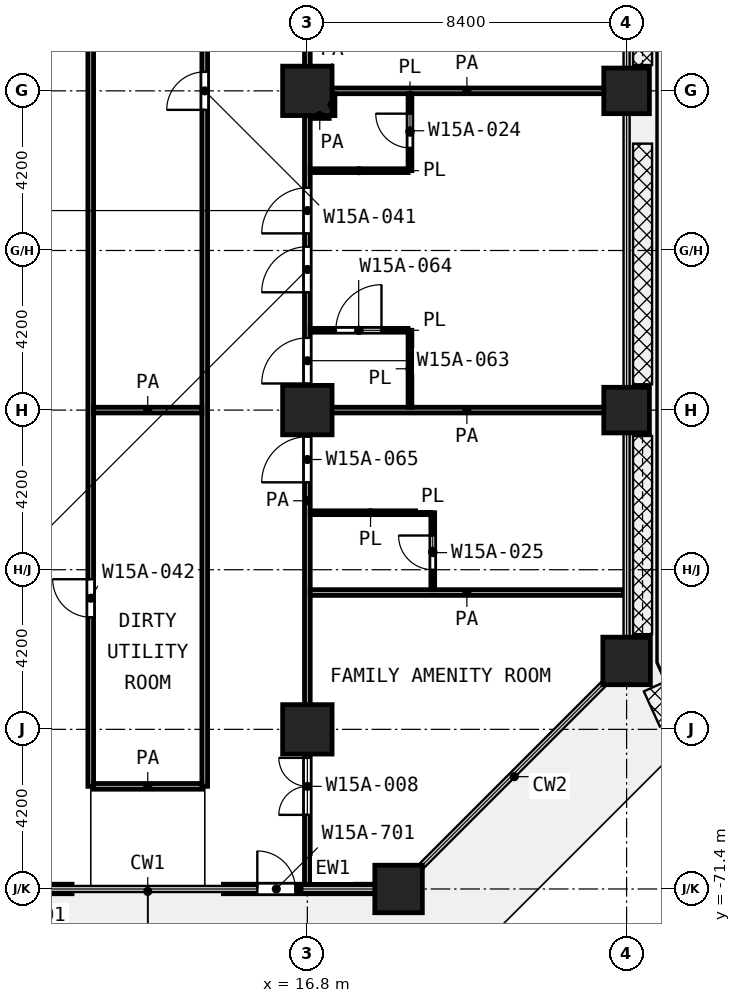
"""IFC4 building model, lengths in metres.
Left out: names, types, materials, properties, quantities, classifications, styles, units other than length and angle.
Written with IfcOpenShell. Run it as: python <this file> out.ifc"""

import sys

from ifc_helpers import new_model, si_unit, direction, frame, frame_2d, origin, origin_2d, place, context, subcontext, project, spatial, rectangle, extrude, element, fill, save


model = new_model("IFC4")
c1 = context("Model", 3, precision=1e-05, world=origin(), true_north=direction((0.0, 1.0)))
c2 = subcontext(c1, "Body", "Model", "MODEL_VIEW")
j1 = project(units=[si_unit("LENGTHUNIT", "METRE"), si_unit("PLANEANGLEUNIT", "RADIAN")], contexts=[c1])
p1 = place(None, origin())
s1 = spatial("IfcSite", under=j1, at=p1, CompositionType="ELEMENT")
p2 = place(p1, origin())
s2 = spatial("IfcBuilding", under=s1, at=p2, CompositionType="ELEMENT")
p3 = place(p2, frame((0.0, 0.0, 68.6)))
s3 = spatial("IfcBuildingStorey", under=s2, at=p3, CompositionType="ELEMENT", Elevation=68.6)
p4 = place(p3, frame((16.8, -50.4, 0.0), z_axis=(0.0, 0.0, 1.0), x_axis=(1.0, 0.0, 0.0)))
e1 = element("IfcColumn", 1, at=p4, inside=s3, PredefinedType="COLUMN", context=c2, shape_type="SweptSolid", body=[
    extrude(rectangle(XDim=1.3, YDim=1.3, at=origin_2d()), origin(), (0.0, 0.0, 1.0), 4.2),
])
p5 = place(p3, frame((25.2, -50.4, 0.0), z_axis=(0.0, 0.0, 1.0), x_axis=(1.0, 0.0, 0.0)))
e2 = element("IfcColumn", 2, at=p5, inside=s3, PredefinedType="COLUMN", context=c2, shape_type="SweptSolid", body=[
    extrude(rectangle(XDim=1.2, YDim=1.2, at=origin_2d()), origin(), (0.0, 0.0, 1.0), 4.2),
])
p6 = place(p3, frame((16.8, -58.8, 0.0), z_axis=(0.0, 0.0, 1.0), x_axis=(1.0, 0.0, 0.0)))
e3 = element("IfcColumn", 3, at=p6, inside=s3, PredefinedType="COLUMN", context=c2, shape_type="SweptSolid", body=[
    extrude(rectangle(XDim=1.3, YDim=1.3, at=origin_2d()), origin(), (0.0, 0.0, 1.0), 4.2),
])
p7 = place(p3, frame((25.2, -58.8, 0.0), z_axis=(0.0, 0.0, 1.0), x_axis=(1.0, 0.0, 0.0)))
e4 = element("IfcColumn", 4, at=p7, inside=s3, PredefinedType="COLUMN", context=c2, shape_type="SweptSolid", body=[
    extrude(rectangle(XDim=1.2, YDim=1.2, at=origin_2d()), origin(), (0.0, 0.0, 1.0), 4.2),
])
p8 = place(p3, frame((25.2, -65.4, 0.0), z_axis=(0.0, 0.0, 1.0), x_axis=(1.0, 0.0, 0.0)))
e5 = element("IfcColumn", 5, at=p8, inside=s3, PredefinedType="COLUMN", context=c2, shape_type="SweptSolid", body=[
    extrude(rectangle(XDim=1.25, YDim=1.25, at=origin_2d()), origin(), (0.0, 0.0, 1.0), 4.2),
])
p9 = place(p3, frame((16.8, -67.2, 0.0), z_axis=(0.0, 0.0, 1.0), x_axis=(1.0, 0.0, 0.0)))
e6 = element("IfcColumn", 6, at=p9, inside=s3, PredefinedType="COLUMN", context=c2, shape_type="SweptSolid", body=[
    extrude(rectangle(XDim=1.3, YDim=1.3, at=origin_2d()), origin(), (0.0, 0.0, 1.0), 4.2),
])
p10 = place(p3, frame((19.2, -71.4, 0.0), z_axis=(0.0, 0.0, 1.0), x_axis=(1.0, 0.0, 0.0)))
e7 = element("IfcColumn", 7, at=p10, inside=s3, PredefinedType="COLUMN", context=c2, shape_type="SweptSolid", body=[
    extrude(rectangle(XDim=1.25, YDim=1.25, at=origin_2d()), origin(), (0.0, 0.0, 1.0), 4.2),
])
p11 = place(p3, frame((6.625, -71.4, 0.0), z_axis=(0.0, 0.0, 1.0), x_axis=(1.0, 0.0, 0.0)))
e8 = element("IfcWall", 8, at=p11, inside=s3, PredefinedType="SOLIDWALL", context=c2, shape_type="SweptSolid", body=[
    extrude(rectangle(XDim=3.983, YDim=0.25, at=frame_2d((1.992, 0.0))), origin(), (0.0, 0.0, 1.0), 3.78),
])
p12 = place(p11, frame((2.092, 0.0, 0.0)))
e9 = element("IfcOpeningElement", 9, at=p12, cuts=e8, PredefinedType="OPENING", context=c2, shape_type="SweptSolid", body=[
    extrude(rectangle(XDim=1.0, YDim=2.1, at=frame_2d((0.5, 1.05))), frame((0.0, 0.135, 0.0), z_axis=(0.0, -1.0, 0.0), x_axis=(1.0, 0.0, 0.0)), (0.0, 0.0, 1.0), 0.27),
])
p13 = place(p3, frame((14.592, -71.4, 0.0), z_axis=(0.0, 0.0, 1.0), x_axis=(1.0, 0.0, 0.0)))
e10 = element("IfcWall", 10, at=p13, inside=s3, PredefinedType="SOLIDWALL", context=c2, shape_type="SweptSolid", body=[
    extrude(rectangle(XDim=3.983, YDim=0.25, at=frame_2d((1.992, 0.0))), origin(), (0.0, 0.0, 1.0), 3.78),
])
p14 = place(p13, frame((0.892, 0.0, 0.0)))
e11 = element("IfcOpeningElement", 11, at=p14, cuts=e10, PredefinedType="OPENING", context=c2, shape_type="SweptSolid", body=[
    extrude(rectangle(XDim=1.0, YDim=2.1, at=frame_2d((0.5, 1.05))), frame((0.0, 0.135, 0.0), z_axis=(0.0, -1.0, 0.0), x_axis=(1.0, 0.0, 0.0)), (0.0, 0.0, 1.0), 0.27),
])
p15 = place(p3, frame((16.875, -61.5, 0.0), z_axis=(0.0, 0.0, 1.0), x_axis=(1.0, 0.0, 0.0)))
e12 = element("IfcWall", 12, at=p15, inside=s3, PredefinedType="PARTITIONING", context=c2, shape_type="SweptSolid", body=[
    extrude(rectangle(XDim=3.175, YDim=0.1, at=frame_2d((1.587, 0.0))), origin(), (0.0, 0.0, 1.0), 3.9),
])
p16 = place(p3, frame((16.875, -56.7, 0.0), z_axis=(0.0, 0.0, 1.0), x_axis=(1.0, 0.0, 0.0)))
e13 = element("IfcWall", 13, at=p16, inside=s3, PredefinedType="PARTITIONING", context=c2, shape_type="SweptSolid", body=[
    extrude(rectangle(XDim=2.575, YDim=0.1, at=frame_2d((1.288, 0.0))), origin(), (0.0, 0.0, 1.0), 3.9),
])
p17 = place(p16, frame((0.675, 0.0, 0.0)))
e14 = element("IfcOpeningElement", 14, at=p17, cuts=e13, PredefinedType="OPENING", context=c2, shape_type="SweptSolid", body=[
    extrude(rectangle(XDim=1.2, YDim=2.1, at=frame_2d((0.6, 1.05))), frame((0.0, 0.06, 0.0), z_axis=(0.0, -1.0, 0.0), x_axis=(1.0, 0.0, 0.0)), (0.0, 0.0, 1.0), 0.12),
])
p18 = place(p3, frame((16.875, -52.5, 0.0), z_axis=(0.0, 0.0, 1.0), x_axis=(1.0, 0.0, 0.0)))
e15 = element("IfcWall", 15, at=p18, inside=s3, PredefinedType="PARTITIONING", context=c2, shape_type="SweptSolid", body=[
    extrude(rectangle(XDim=2.575, YDim=0.1, at=frame_2d((1.288, 0.0))), origin(), (0.0, 0.0, 1.0), 3.9),
])
p19 = place(p3, frame((19.5, -58.725, 0.0), z_axis=(0.0, 0.0, 1.0), x_axis=(0.0, 1.0, 0.0)))
e16 = element("IfcWall", 16, at=p19, inside=s3, PredefinedType="PARTITIONING", context=c2, shape_type="SweptSolid", body=[
    extrude(rectangle(XDim=2.025, YDim=0.1, at=frame_2d((1.013, 0.0))), origin(), (0.0, 0.0, 1.0), 3.9),
])
p20 = place(p3, frame((19.5, -52.5, 0.0), z_axis=(0.0, 0.0, 1.0), x_axis=(0.0, 1.0, 0.0)))
e17 = element("IfcWall", 17, at=p20, inside=s3, PredefinedType="PARTITIONING", context=c2, shape_type="SweptSolid", body=[
    extrude(rectangle(XDim=2.025, YDim=0.1, at=frame_2d((1.012, 0.0))), origin(), (0.0, 0.0, 1.0), 3.9),
])
p21 = place(p20, frame((0.6, 0.0, 0.0)))
e18 = element("IfcOpeningElement", 18, at=p21, cuts=e17, PredefinedType="OPENING", context=c2, shape_type="SweptSolid", body=[
    extrude(rectangle(XDim=0.9, YDim=2.1, at=frame_2d((0.45, 1.05))), frame((0.0, 0.06, 0.0), z_axis=(0.0, -1.0, 0.0), x_axis=(1.0, 0.0, 0.0)), (0.0, 0.0, 1.0), 0.12),
])
p22 = place(p3, frame((20.1, -63.525, 0.0), z_axis=(0.0, 0.0, 1.0), x_axis=(0.0, 1.0, 0.0)))
e19 = element("IfcWall", 19, at=p22, inside=s3, PredefinedType="PARTITIONING", context=c2, shape_type="SweptSolid", body=[
    extrude(rectangle(XDim=2.025, YDim=0.1, at=frame_2d((1.012, 0.0))), origin(), (0.0, 0.0, 1.0), 3.9),
])
p23 = place(p22, frame((0.525, 0.0, 0.0)))
e20 = element("IfcOpeningElement", 20, at=p23, cuts=e19, PredefinedType="OPENING", context=c2, shape_type="SweptSolid", body=[
    extrude(rectangle(XDim=0.9, YDim=2.1, at=frame_2d((0.45, 1.05))), frame((0.0, 0.06, 0.0), z_axis=(0.0, -1.0, 0.0), x_axis=(1.0, 0.0, 0.0)), (0.0, 0.0, 1.0), 0.12),
])
p24 = place(p3, frame((11.175, -68.7, 0.0), z_axis=(0.0, 0.0, 1.0), x_axis=(1.0, 0.0, 0.0)))
e21 = element("IfcWall", 21, at=p24, inside=s3, PredefinedType="PARTITIONING", context=c2, shape_type="SweptSolid", body=[
    extrude(rectangle(XDim=2.85, YDim=0.15, at=frame_2d((1.425, 0.0))), origin(), (0.0, 0.0, 1.0), 3.9),
])
p25 = place(p3, frame((16.875, -63.6, 0.0), z_axis=(0.0, 0.0, 1.0), x_axis=(1.0, 0.0, 0.0)))
e22 = element("IfcWall", 22, at=p25, inside=s3, PredefinedType="PARTITIONING", context=c2, shape_type="SweptSolid", body=[
    extrude(rectangle(XDim=8.245, YDim=0.15, at=frame_2d((4.123, 0.0))), origin(), (0.0, 0.0, 1.0), 3.9),
])
p26 = place(p3, frame((11.175, -58.8, 0.0), z_axis=(0.0, 0.0, 1.0), x_axis=(1.0, 0.0, 0.0)))
e23 = element("IfcWall", 23, at=p26, inside=s3, PredefinedType="PARTITIONING", context=c2, shape_type="SweptSolid", body=[
    extrude(rectangle(XDim=2.85, YDim=0.15, at=frame_2d((1.425, 0.0))), origin(), (0.0, 0.0, 1.0), 3.9),
])
p27 = place(p3, frame((16.875, -58.8, 0.0), z_axis=(0.0, 0.0, 1.0), x_axis=(1.0, 0.0, 0.0)))
e24 = element("IfcWall", 24, at=p27, inside=s3, PredefinedType="PARTITIONING", context=c2, shape_type="SweptSolid", body=[
    extrude(rectangle(XDim=8.245, YDim=0.15, at=frame_2d((4.123, 0.0))), origin(), (0.0, 0.0, 1.0), 3.9),
])
p28 = place(p3, frame((16.877, -51.05, 0.0), z_axis=(0.0, 0.0, 1.0), x_axis=(1.0, 0.0, 0.0)))
e25 = element("IfcWall", 25, at=p28, inside=s3, PredefinedType="PARTITIONING", context=c2, shape_type="SweptSolid", body=[
    extrude(rectangle(XDim=0.498, YDim=0.15, at=frame_2d((0.249, 0.0))), origin(), (0.0, 0.0, 1.0), 3.9),
])
p29 = place(p3, frame((16.877, -50.4, 0.0), z_axis=(0.0, 0.0, 1.0), x_axis=(1.0, 0.0, 0.0)))
e26 = element("IfcWall", 26, at=p29, inside=s3, PredefinedType="PARTITIONING", context=c2, shape_type="SweptSolid", body=[
    extrude(rectangle(XDim=8.243, YDim=0.15, at=frame_2d((4.122, 0.0))), origin(), (0.0, 0.0, 1.0), 3.9),
])
p30 = place(p3, frame((11.1, -68.7, 0.0), z_axis=(0.0, 0.0, 1.0), x_axis=(0.0, 1.0, 0.0)))
e27 = element("IfcWall", 27, at=p30, inside=s3, PredefinedType="PARTITIONING", context=c2, shape_type="SweptSolid", body=[
    extrude(rectangle(XDim=39.3, YDim=0.15, at=frame_2d((19.65, 0.0))), origin(), (0.0, 0.0, 1.0), 3.9),
])
p31 = place(p30, frame((34.3, 0.0, 0.0)))
e28 = element("IfcOpeningElement", 28, at=p31, cuts=e27, PredefinedType="OPENING", context=c2, shape_type="SweptSolid", body=[
    extrude(rectangle(XDim=1.0, YDim=2.1, at=frame_2d((0.5, 1.05))), frame((0.0, 0.085, 0.0), z_axis=(0.0, -1.0, 0.0), x_axis=(1.0, 0.0, 0.0)), (0.0, 0.0, 1.0), 0.17),
])
p32 = place(p30, frame((28.0, 0.0, 0.0)))
e29 = element("IfcOpeningElement", 29, at=p32, cuts=e27, PredefinedType="OPENING", context=c2, shape_type="SweptSolid", body=[
    extrude(rectangle(XDim=1.0, YDim=2.1, at=frame_2d((0.5, 1.05))), frame((0.0, 0.085, 0.0), z_axis=(0.0, -1.0, 0.0), x_axis=(1.0, 0.0, 0.0)), (0.0, 0.0, 1.0), 0.17),
])
p33 = place(p30, frame((4.45, 0.0, 0.0)))
e30 = element("IfcOpeningElement", 30, at=p33, cuts=e27, PredefinedType="OPENING", context=c2, shape_type="SweptSolid", body=[
    extrude(rectangle(XDim=1.0, YDim=2.1, at=frame_2d((0.5, 1.05))), frame((0.0, 0.085, 0.0), z_axis=(0.0, -1.0, 0.0), x_axis=(1.0, 0.0, 0.0)), (0.0, 0.0, 1.0), 0.17),
])
p34 = place(p3, frame((14.1, -68.7, 0.0), z_axis=(0.0, 0.0, 1.0), x_axis=(0.0, 1.0, 0.0)))
e31 = element("IfcWall", 31, at=p34, inside=s3, PredefinedType="PARTITIONING", context=c2, shape_type="SweptSolid", body=[
    extrude(rectangle(XDim=39.3, YDim=0.15, at=frame_2d((19.65, 0.0))), origin(), (0.0, 0.0, 1.0), 3.9),
])
p35 = place(p34, frame((17.8, 0.0, 0.0)))
e32 = element("IfcOpeningElement", 32, at=p35, cuts=e31, PredefinedType="OPENING", context=c2, shape_type="SweptSolid", body=[
    extrude(rectangle(XDim=1.0, YDim=2.1, at=frame_2d((0.5, 1.05))), frame((0.0, 0.085, 0.0), z_axis=(0.0, -1.0, 0.0), x_axis=(1.0, 0.0, 0.0)), (0.0, 0.0, 1.0), 0.17),
])
p36 = place(p3, frame((16.8, -71.32, 0.0), z_axis=(0.0, 0.0, 1.0), x_axis=(0.0, 1.0, 0.0)))
e33 = element("IfcWall", 33, at=p36, inside=s3, PredefinedType="PARTITIONING", context=c2, shape_type="SweptSolid", body=[
    extrude(rectangle(XDim=20.268, YDim=0.15, at=frame_2d((10.134, 0.0))), origin(), (0.0, 0.0, 1.0), 3.9),
])
p37 = place(p36, frame((17.17, 0.0, 0.0)))
e34 = element("IfcOpeningElement", 34, at=p37, cuts=e33, PredefinedType="OPENING", context=c2, shape_type="SweptSolid", body=[
    extrude(rectangle(XDim=1.2, YDim=2.1, at=frame_2d((0.6, 1.05))), frame((0.0, 0.085, 0.0), z_axis=(0.0, -1.0, 0.0), x_axis=(1.0, 0.0, 0.0)), (0.0, 0.0, 1.0), 0.17),
])
p38 = place(p36, frame((15.62, 0.0, 0.0)))
e35 = element("IfcOpeningElement", 35, at=p38, cuts=e33, PredefinedType="OPENING", context=c2, shape_type="SweptSolid", body=[
    extrude(rectangle(XDim=1.2, YDim=2.1, at=frame_2d((0.6, 1.05))), frame((0.0, 0.085, 0.0), z_axis=(0.0, -1.0, 0.0), x_axis=(1.0, 0.0, 0.0)), (0.0, 0.0, 1.0), 0.17),
])
p39 = place(p36, frame((13.22, 0.0, 0.0)))
e36 = element("IfcOpeningElement", 36, at=p39, cuts=e33, PredefinedType="OPENING", context=c2, shape_type="SweptSolid", body=[
    extrude(rectangle(XDim=1.2, YDim=2.1, at=frame_2d((0.6, 1.05))), frame((0.0, 0.085, 0.0), z_axis=(0.0, -1.0, 0.0), x_axis=(1.0, 0.0, 0.0)), (0.0, 0.0, 1.0), 0.17),
])
p40 = place(p36, frame((10.62, 0.0, 0.0)))
e37 = element("IfcOpeningElement", 37, at=p40, cuts=e33, PredefinedType="OPENING", context=c2, shape_type="SweptSolid", body=[
    extrude(rectangle(XDim=1.2, YDim=2.1, at=frame_2d((0.6, 1.05))), frame((0.0, 0.085, 0.0), z_axis=(0.0, -1.0, 0.0), x_axis=(1.0, 0.0, 0.0)), (0.0, 0.0, 1.0), 0.17),
])
p41 = place(p36, frame((1.87, 0.0, 0.0)))
e38 = element("IfcOpeningElement", 38, at=p41, cuts=e33, PredefinedType="OPENING", context=c2, shape_type="SweptSolid", body=[
    extrude(rectangle(XDim=1.5, YDim=2.1, at=frame_2d((0.75, 1.05))), frame((0.0, 0.085, 0.0), z_axis=(0.0, -1.0, 0.0), x_axis=(1.0, 0.0, 0.0)), (0.0, 0.0, 1.0), 0.17),
])
p42 = place(p3, frame((16.8, -50.398, 0.0), z_axis=(0.0, 0.0, 1.0), x_axis=(0.0, 1.0, 0.0)))
e39 = element("IfcWall", 39, at=p42, inside=s3, PredefinedType="PARTITIONING", context=c2, shape_type="SweptSolid", body=[
    extrude(rectangle(XDim=25.298, YDim=0.15, at=frame_2d((12.649, 0.0))), origin(), (0.0, 0.0, 1.0), 3.9),
])
p43 = place(p42, frame((14.598, 0.0, 0.0)))
e40 = element("IfcOpeningElement", 40, at=p43, cuts=e39, PredefinedType="OPENING", context=c2, shape_type="SweptSolid", body=[
    extrude(rectangle(XDim=1.5, YDim=2.1, at=frame_2d((0.75, 1.05))), frame((0.0, 0.085, 0.0), z_axis=(0.0, -1.0, 0.0), x_axis=(1.0, 0.0, 0.0)), (0.0, 0.0, 1.0), 0.17),
])
p44 = place(p42, frame((6.498, 0.0, 0.0)))
e41 = element("IfcOpeningElement", 41, at=p44, cuts=e39, PredefinedType="OPENING", context=c2, shape_type="SweptSolid", body=[
    extrude(rectangle(XDim=1.2, YDim=2.1, at=frame_2d((0.6, 1.05))), frame((0.0, 0.085, 0.0), z_axis=(0.0, -1.0, 0.0), x_axis=(1.0, 0.0, 0.0)), (0.0, 0.0, 1.0), 0.17),
])
p45 = place(p42, frame((5.048, 0.0, 0.0)))
e42 = element("IfcOpeningElement", 42, at=p45, cuts=e39, PredefinedType="OPENING", context=c2, shape_type="SweptSolid", body=[
    extrude(rectangle(XDim=1.1, YDim=2.1, at=frame_2d((0.55, 1.05))), frame((0.0, 0.085, 0.0), z_axis=(0.0, -1.0, 0.0), x_axis=(1.0, 0.0, 0.0)), (0.0, 0.0, 1.0), 0.17),
])
p46 = place(p42, frame((1.199, 0.0, 0.0)))
e43 = element("IfcOpeningElement", 43, at=p46, cuts=e39, PredefinedType="OPENING", context=c2, shape_type="SweptSolid", body=[
    extrude(rectangle(XDim=1.2, YDim=2.1, at=frame_2d((0.6, 1.05))), frame((0.0, 0.085, 0.0), z_axis=(0.0, -1.0, 0.0), x_axis=(1.0, 0.0, 0.0)), (0.0, 0.0, 1.0), 0.17),
])
p47 = place(p3, frame((17.45, -51.05, 0.0), z_axis=(0.0, 0.0, 1.0), x_axis=(0.0, 1.0, 0.0)))
e44 = element("IfcWall", 44, at=p47, inside=s3, PredefinedType="PARTITIONING", context=c2, shape_type="SweptSolid", body=[
    extrude(rectangle(XDim=0.575, YDim=0.15, at=frame_2d((0.288, 0.0))), origin(), (0.0, 0.0, 1.0), 3.9),
])
p48 = place(p14, origin())
e45 = element("IfcDoor", 45, at=p48, inside=s3, OperationType="SINGLE_SWING_LEFT", PredefinedType="DOOR", context=c2, shape_type="SweptSolid", body=[
    extrude(rectangle(XDim=1.0, YDim=2.1, at=frame_2d((0.5, 1.05))), frame((0.0, 0.025, 0.0), z_axis=(0.0, -1.0, 0.0), x_axis=(1.0, 0.0, 0.0)), (0.0, 0.0, 1.0), 0.05),
])
fill(e11, e45)
p49 = place(p35, origin())
e46 = element("IfcDoor", 46, at=p49, inside=s3, OperationType="SINGLE_SWING_LEFT", PredefinedType="DOOR", context=c2, shape_type="SweptSolid", body=[
    extrude(rectangle(XDim=1.0, YDim=2.1, at=frame_2d((0.5, 1.05))), frame((0.0, 0.025, 0.0), z_axis=(0.0, -1.0, 0.0), x_axis=(1.0, 0.0, 0.0)), (0.0, 0.0, 1.0), 0.05),
])
fill(e32, e46)
p50 = place(p33, origin())
e47 = element("IfcDoor", 47, at=p50, inside=s3, OperationType="SINGLE_SWING_RIGHT", PredefinedType="DOOR", context=c2, shape_type="SweptSolid", body=[
    extrude(rectangle(XDim=1.0, YDim=2.1, at=frame_2d((0.5, 1.05))), frame((0.0, 0.025, 0.0), z_axis=(0.0, -1.0, 0.0), x_axis=(1.0, 0.0, 0.0)), (0.0, 0.0, 1.0), 0.05),
])
fill(e30, e47)
p51 = place(p37, origin())
e48 = element("IfcDoor", 48, at=p51, inside=s3, OperationType="SINGLE_SWING_LEFT", PredefinedType="DOOR", context=c2, shape_type="SweptSolid", body=[
    extrude(rectangle(XDim=1.2, YDim=2.1, at=frame_2d((0.6, 1.05))), frame((0.0, 0.025, 0.0), z_axis=(0.0, -1.0, 0.0), x_axis=(1.0, 0.0, 0.0)), (0.0, 0.0, 1.0), 0.05),
])
fill(e34, e48)
p52 = place(p38, origin())
e49 = element("IfcDoor", 49, at=p52, inside=s3, OperationType="SINGLE_SWING_LEFT", PredefinedType="DOOR", context=c2, shape_type="SweptSolid", body=[
    extrude(rectangle(XDim=1.2, YDim=2.1, at=frame_2d((0.6, 1.05))), frame((0.0, 0.025, 0.0), z_axis=(0.0, -1.0, 0.0), x_axis=(1.0, 0.0, 0.0)), (0.0, 0.0, 1.0), 0.05),
])
fill(e35, e49)
p53 = place(p39, origin())
e50 = element("IfcDoor", 50, at=p53, inside=s3, OperationType="SINGLE_SWING_LEFT", PredefinedType="DOOR", context=c2, shape_type="SweptSolid", body=[
    extrude(rectangle(XDim=1.2, YDim=2.1, at=frame_2d((0.6, 1.05))), frame((0.0, 0.025, 0.0), z_axis=(0.0, -1.0, 0.0), x_axis=(1.0, 0.0, 0.0)), (0.0, 0.0, 1.0), 0.05),
])
fill(e36, e50)
p54 = place(p17, origin())
e51 = element("IfcDoor", 51, at=p54, inside=s3, OperationType="SINGLE_SWING_RIGHT", PredefinedType="DOOR", context=c2, shape_type="SweptSolid", body=[
    extrude(rectangle(XDim=1.2, YDim=2.1, at=frame_2d((0.6, 1.05))), frame((0.0, 0.025, 0.0), z_axis=(0.0, -1.0, 0.0), x_axis=(1.0, 0.0, 0.0)), (0.0, 0.0, 1.0), 0.05),
])
fill(e14, e51)
p55 = place(p21, origin())
e52 = element("IfcDoor", 52, at=p55, inside=s3, OperationType="SINGLE_SWING_RIGHT", PredefinedType="DOOR", context=c2, shape_type="SweptSolid", body=[
    extrude(rectangle(XDim=0.9, YDim=2.1, at=frame_2d((0.45, 1.05))), frame((0.0, 0.025, 0.0), z_axis=(0.0, -1.0, 0.0), x_axis=(1.0, 0.0, 0.0)), (0.0, 0.0, 1.0), 0.05),
])
fill(e18, e52)
p56 = place(p40, origin())
e53 = element("IfcDoor", 53, at=p56, inside=s3, OperationType="SINGLE_SWING_LEFT", PredefinedType="DOOR", context=c2, shape_type="SweptSolid", body=[
    extrude(rectangle(XDim=1.2, YDim=2.1, at=frame_2d((0.6, 1.05))), frame((0.0, 0.025, 0.0), z_axis=(0.0, -1.0, 0.0), x_axis=(1.0, 0.0, 0.0)), (0.0, 0.0, 1.0), 0.05),
])
fill(e37, e53)
p57 = place(p23, origin())
e54 = element("IfcDoor", 54, at=p57, inside=s3, OperationType="SINGLE_SWING_RIGHT", PredefinedType="DOOR", context=c2, shape_type="SweptSolid", body=[
    extrude(rectangle(XDim=0.9, YDim=2.1, at=frame_2d((0.45, 1.05))), frame((0.0, 0.025, 0.0), z_axis=(0.0, -1.0, 0.0), x_axis=(1.0, 0.0, 0.0)), (0.0, 0.0, 1.0), 0.05),
])
fill(e20, e54)
p58 = place(p41, origin())
e55 = element("IfcDoor", 55, at=p58, inside=s3, OperationType="DOUBLE_DOOR_SINGLE_SWING", PredefinedType="DOOR", context=c2, shape_type="SweptSolid", body=[
    extrude(rectangle(XDim=1.5, YDim=2.1, at=frame_2d((0.75, 1.05))), frame((0.0, 0.025, 0.0), z_axis=(0.0, -1.0, 0.0), x_axis=(1.0, 0.0, 0.0)), (0.0, 0.0, 1.0), 0.05),
])
fill(e38, e55)
save(model, sys.argv[1])
